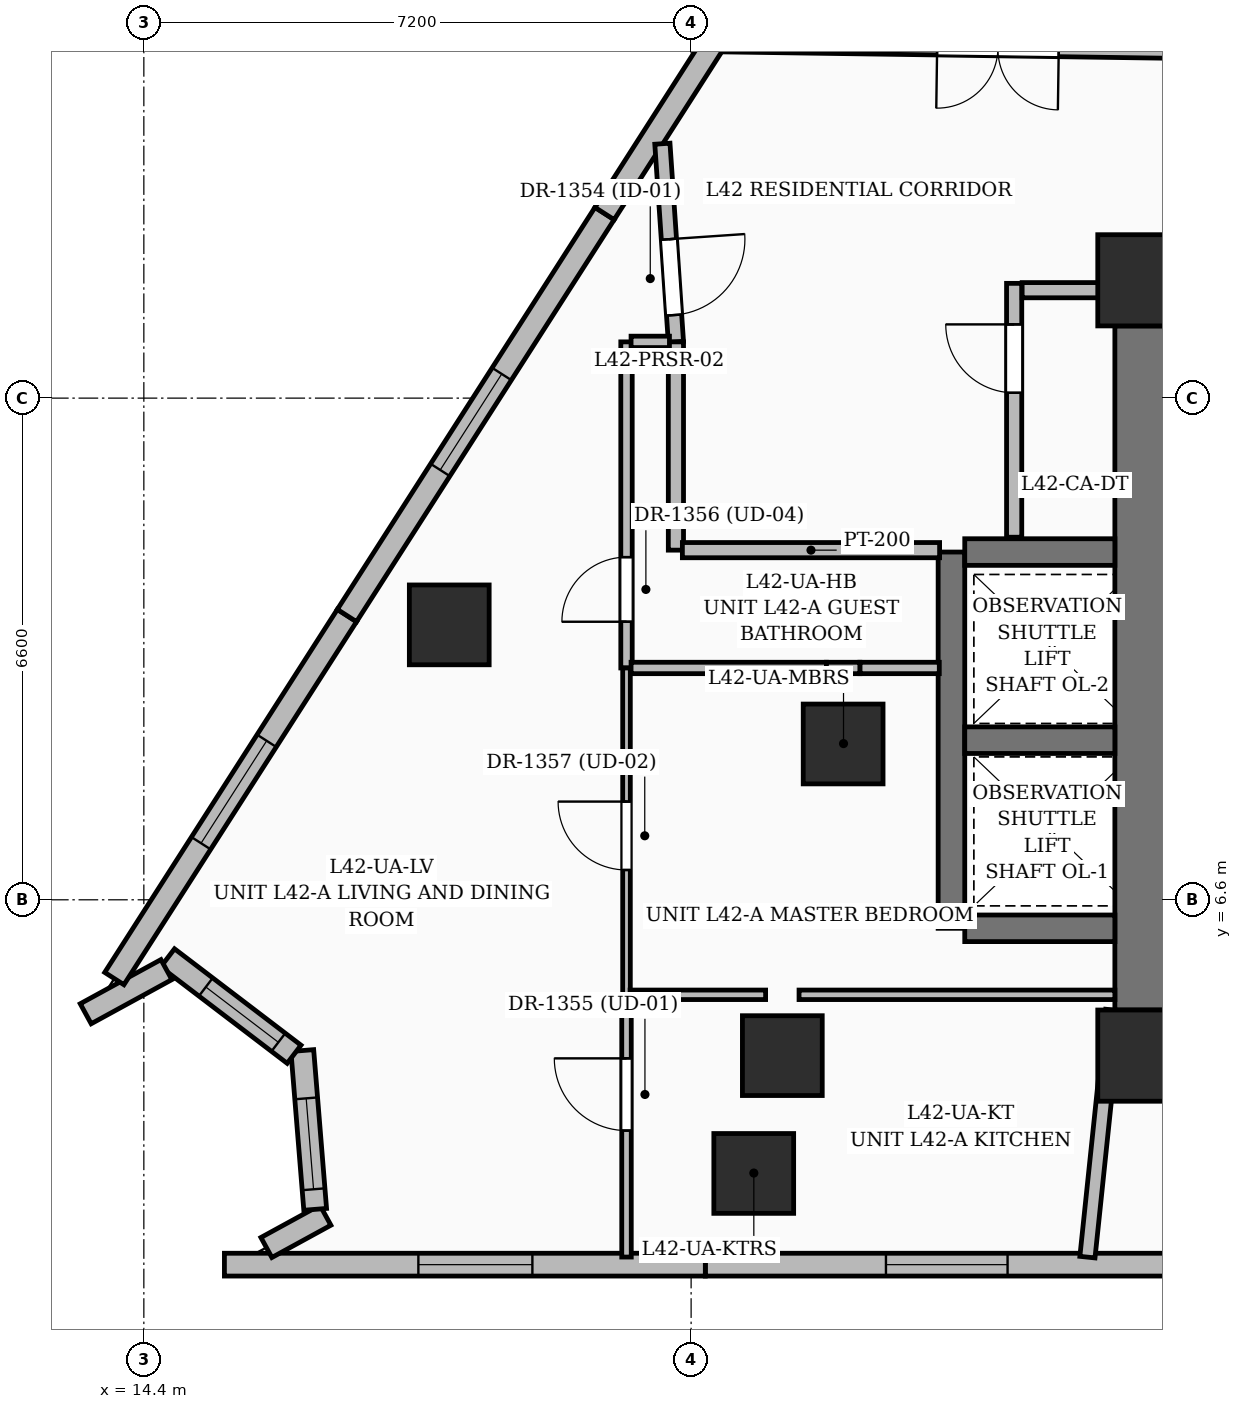
"""IFC4 building model, lengths in metres.
Left out: names, types, materials, properties, quantities, classifications, styles, units other than length and angle.
Written with IfcOpenShell. Run it as: python <this file> out.ifc"""

import sys

from ifc_helpers import new_model, si_unit, direction, frame, frame_2d, origin, origin_2d, place, context, subcontext, project, spatial, rectangle, extrude, element, fill, save


model = new_model("IFC4")
c1 = context("Model", 3, precision=1e-05, world=origin(), true_north=direction((0.0, 1.0)))
c2 = subcontext(c1, "Body", "Model", "MODEL_VIEW")
j1 = project(units=[si_unit("LENGTHUNIT", "METRE"), si_unit("PLANEANGLEUNIT", "RADIAN")], contexts=[c1])
p1 = place(None, origin())
s1 = spatial("IfcSite", under=j1, at=p1, CompositionType="ELEMENT")
p2 = place(p1, origin())
s2 = spatial("IfcBuilding", under=s1, at=p2, CompositionType="ELEMENT")
p3 = place(p2, frame((0.0, 0.0, 164.4)))
s3 = spatial("IfcBuildingStorey", under=s2, at=p3, CompositionType="ELEMENT", Elevation=164.4)
for number, where, z_axis, x_axis in (
    (1, (27.55, 4.55, 0.0), (0.0, 0.0, 1.0), (1.0, 0.0, 0.0)),
    (2, (27.55, 14.75, 0.0), (0.0, 0.0, 1.0), (1.0, 0.0, 0.0)),
):
    element("IfcColumn", number, at=place(p3, frame(where, z_axis=z_axis, x_axis=x_axis)), inside=s3, PredefinedType="COLUMN", context=c2, shape_type="SweptSolid", body=[
        extrude(rectangle(XDim=1.2, YDim=1.2, at=origin_2d()), origin(), (0.0, 0.0, 1.0), 3.6),
    ])
for number, where, z_axis, x_axis in (
    (3, (22.8, 4.55, 0.0), (0.0, 0.0, 1.0), (1.0, 0.0, 0.0)),
    (4, (23.6, 8.65, 0.0), (0.0, 0.0, 1.0), (1.0, 0.0, 0.0)),
):
    element("IfcColumn", number, at=place(p3, frame(where, z_axis=z_axis, x_axis=x_axis)), inside=s3, PredefinedType="COLUMN", context=c2, shape_type="SweptSolid", body=[
        extrude(rectangle(XDim=1.05, YDim=1.05, at=origin_2d()), origin(), (0.0, 0.0, 1.0), 3.6),
    ])
p4 = place(p3, frame((27.55, 5.15, 0.0), z_axis=(0.0, 0.0, 1.0), x_axis=(0.0, 1.0, 0.0)))
e5 = element("IfcWall", 5, at=p4, inside=s3, PredefinedType="SHEAR", context=c2, shape_type="SweptSolid", body=[
    extrude(rectangle(XDim=9.0, YDim=0.75, at=frame_2d((4.5, 0.0))), origin(), (0.0, 0.0, 1.0), 3.6),
])
p5 = place(p3, frame((25.025, 6.225, 0.0), z_axis=(0.0, 0.0, 1.0), x_axis=(0.0, 1.0, 0.0)))
e6 = element("IfcWall", 6, at=p5, inside=s3, PredefinedType="SOLIDWALL", context=c2, shape_type="SweptSolid", body=[
    extrude(rectangle(XDim=4.95, YDim=0.35, at=frame_2d((2.475, 0.0))), origin(), (0.0, 0.0, 1.0), 3.6),
])
for number, where, z_axis, x_axis in (
    (7, (25.2, 6.225, 0.0), (0.0, 0.0, 1.0), (1.0, 0.0, 0.0)),
    (8, (25.2, 8.7, 0.0), (0.0, 0.0, 1.0), (1.0, 0.0, 0.0)),
    (9, (25.2, 11.175, 0.0), (0.0, 0.0, 1.0), (1.0, 0.0, 0.0)),
):
    element("IfcWall", number, at=place(p3, frame(where, z_axis=z_axis, x_axis=x_axis)), inside=s3, PredefinedType="SOLIDWALL", context=c2, shape_type="SweptSolid", body=[
        extrude(rectangle(XDim=1.975, YDim=0.35, at=frame_2d((0.988, 0.0))), origin(), (0.0, 0.0, 1.0), 3.6),
    ])
for number, where, z_axis, x_axis in (
    (10, (22.424, 3.0, 0.0), (0.0, 0.0, 1.0), (1.0, 0.0, 0.0)),
    (11, (18.418, 10.217, 0.0), (0.0, 0.0, 1.0), (1.0, 0.0, 0.0)),
):
    element("IfcColumn", number, at=place(p3, frame(where, z_axis=z_axis, x_axis=x_axis)), inside=s3, PredefinedType="COLUMN", context=c2, shape_type="SweptSolid", body=[
        extrude(rectangle(XDim=1.05, YDim=1.05, at=origin_2d()), origin(), (0.0, 0.0, 1.0), 3.6),
    ])
p6 = place(p3, frame((28.113, 1.8, 0.0), z_axis=(0.0, 0.0, 1.0), x_axis=(-1.0, 0.0, 0.0)))
e12 = element("IfcWall", 12, at=p6, inside=s3, PredefinedType="SOLIDWALL", context=c2, shape_type="SweptSolid", body=[
    extrude(rectangle(XDim=6.327, YDim=0.3, at=frame_2d((3.163, 0.0))), origin(), (0.0, 0.0, 1.0), 3.35),
])
p7 = place(p6, frame((2.35, 0.0, 0.55)))
e13 = element("IfcOpeningElement", 13, at=p7, cuts=e12, PredefinedType="OPENING", context=c2, shape_type="SweptSolid", body=[
    extrude(rectangle(XDim=1.6, YDim=2.2, at=frame_2d((0.8, 1.1))), frame((0.0, 0.16, 0.0), z_axis=(0.0, -1.0, 0.0), x_axis=(1.0, 0.0, 0.0)), (0.0, 0.0, 1.0), 0.32),
])
p8 = place(p3, frame((21.787, 1.8, 0.0), z_axis=(0.0, 0.0, 1.0), x_axis=(-1.0, 0.0, 0.0)))
e14 = element("IfcWall", 14, at=p8, inside=s3, PredefinedType="SOLIDWALL", context=c2, shape_type="SweptSolid", body=[
    extrude(rectangle(XDim=6.327, YDim=0.3, at=frame_2d((3.163, 0.0))), origin(), (0.0, 0.0, 1.0), 3.35),
])
p9 = place(p8, frame((2.275, 0.0, 0.6)))
e15 = element("IfcOpeningElement", 15, at=p9, cuts=e14, PredefinedType="OPENING", context=c2, shape_type="SweptSolid", body=[
    extrude(rectangle(XDim=1.5, YDim=2.1, at=frame_2d((0.75, 1.05))), frame((0.0, 0.16, 0.0), z_axis=(0.0, -1.0, 0.0), x_axis=(1.0, 0.0, 0.0)), (0.0, 0.0, 1.0), 0.32),
])
p10 = place(p3, frame((16.012, 2.025, 0.0), z_axis=(0.0, 0.0, 1.0), x_axis=(0.877262241919, 0.480011415389, 0.0)))
e16 = element("IfcWall", 16, at=p10, inside=s3, PredefinedType="SOLIDWALL", context=c2, shape_type="SweptSolid", body=[
    extrude(rectangle(XDim=0.885, YDim=0.3, at=frame_2d((0.442, 0.0))), origin(), (0.0, 0.0, 1.0), 3.35),
])
p11 = place(p3, frame((16.654, 2.528, 0.0), z_axis=(0.0, 0.0, 1.0), x_axis=(-0.080962879454, 0.996717117416, 0.0)))
e17 = element("IfcWall", 17, at=p11, inside=s3, PredefinedType="SOLIDWALL", context=c2, shape_type="SweptSolid", body=[
    extrude(rectangle(XDim=2.096, YDim=0.3, at=frame_2d((1.048, 0.0))), origin(), (0.0, 0.0, 1.0), 3.35),
])
p12 = place(p11, frame((0.265, 0.0, 0.8)))
e18 = element("IfcOpeningElement", 18, at=p12, cuts=e17, PredefinedType="OPENING", context=c2, shape_type="SweptSolid", body=[
    extrude(rectangle(XDim=1.2, YDim=1.8, at=frame_2d((0.6, 0.9))), frame((0.0, 0.16, 0.0), z_axis=(0.0, -1.0, 0.0), x_axis=(1.0, 0.0, 0.0)), (0.0, 0.0, 1.0), 0.32),
])
p13 = place(p3, frame((16.377, 4.568, 0.0), z_axis=(0.0, 0.0, 1.0), x_axis=(-0.795383499791, 0.606106499107, 0.0)))
e19 = element("IfcWall", 19, at=p13, inside=s3, PredefinedType="SOLIDWALL", context=c2, shape_type="SweptSolid", body=[
    extrude(rectangle(XDim=2.092, YDim=0.3, at=frame_2d((1.046, 0.0))), origin(), (0.0, 0.0, 1.0), 3.35),
])
p14 = place(p13, frame((0.26, 0.0, 0.8)))
e20 = element("IfcOpeningElement", 20, at=p14, cuts=e19, PredefinedType="OPENING", context=c2, shape_type="SweptSolid", body=[
    extrude(rectangle(XDim=1.2, YDim=1.8, at=frame_2d((0.6, 0.9))), frame((0.0, 0.16, 0.0), z_axis=(0.0, -1.0, 0.0), x_axis=(1.0, 0.0, 0.0)), (0.0, 0.0, 1.0), 0.32),
])
p15 = place(p3, frame((14.697, 5.681, 0.0), z_axis=(0.0, 0.0, 1.0), x_axis=(-0.877355211776, -0.47984146587, 0.0)))
e21 = element("IfcWall", 21, at=p15, inside=s3, PredefinedType="SOLIDWALL", context=c2, shape_type="SweptSolid", body=[
    extrude(rectangle(XDim=1.21, YDim=0.3, at=frame_2d((0.605, 0.0))), origin(), (0.0, 0.0, 1.0), 3.35),
])
p16 = place(p3, frame((14.012, 5.564, 0.0), z_axis=(0.0, 0.0, 1.0), x_axis=(0.539510437932, 0.841978911471, 0.0)))
e22 = element("IfcWall", 22, at=p16, inside=s3, PredefinedType="SOLIDWALL", context=c2, shape_type="SweptSolid", body=[
    extrude(rectangle(XDim=5.672, YDim=0.3, at=frame_2d((2.836, 0.0))), origin(), (0.0, 0.0, 1.0), 3.35),
])
p17 = place(p16, frame((2.115, 0.0, 0.55)))
e23 = element("IfcOpeningElement", 23, at=p17, cuts=e22, PredefinedType="OPENING", context=c2, shape_type="SweptSolid", body=[
    extrude(rectangle(XDim=1.6, YDim=2.2, at=frame_2d((0.8, 1.1))), frame((0.0, 0.16, 0.0), z_axis=(0.0, -1.0, 0.0), x_axis=(1.0, 0.0, 0.0)), (0.0, 0.0, 1.0), 0.32),
])
p18 = place(p3, frame((17.072, 10.339, 0.0), z_axis=(0.0, 0.0, 1.0), x_axis=(0.539533329528, 0.841964242904, 0.0)))
e24 = element("IfcWall", 24, at=p18, inside=s3, PredefinedType="SOLIDWALL", context=c2, shape_type="SweptSolid", body=[
    extrude(rectangle(XDim=6.282, YDim=0.3, at=frame_2d((3.141, 0.0))), origin(), (0.0, 0.0, 1.0), 3.35),
])
p19 = place(p18, frame((2.275, 0.0, 0.6)))
e25 = element("IfcOpeningElement", 25, at=p19, cuts=e24, PredefinedType="OPENING", context=c2, shape_type="SweptSolid", body=[
    extrude(rectangle(XDim=1.5, YDim=2.1, at=frame_2d((0.75, 1.05))), frame((0.0, 0.16, 0.0), z_axis=(0.0, -1.0, 0.0), x_axis=(1.0, 0.0, 0.0)), (0.0, 0.0, 1.0), 0.32),
])
p20 = place(p3, frame((20.461, 15.629, 0.0), z_axis=(0.0, 0.0, 1.0), x_axis=(0.539533786056, 0.841963950359, 0.0)))
e26 = element("IfcWall", 26, at=p20, inside=s3, PredefinedType="SOLIDWALL", context=c2, shape_type="SweptSolid", body=[
    extrude(rectangle(XDim=6.002, YDim=0.3, at=frame_2d((3.001, 0.0))), origin(), (0.0, 0.0, 1.0), 3.35),
])
p21 = place(p20, frame((3.8, 0.0, 0.8)))
e27 = element("IfcOpeningElement", 27, at=p21, cuts=e26, PredefinedType="OPENING", context=c2, shape_type="SweptSolid", body=[
    extrude(rectangle(XDim=1.2, YDim=1.8, at=frame_2d((0.6, 0.9))), frame((0.0, 0.16, 0.0), z_axis=(0.0, -1.0, 0.0), x_axis=(1.0, 0.0, 0.0)), (0.0, 0.0, 1.0), 0.32),
])
p22 = place(p3, frame((25.85, 11.37, 0.0), z_axis=(0.0, 0.0, 1.0), x_axis=(0.0, 1.0, 0.0)))
e28 = element("IfcWall", 28, at=p22, inside=s3, PredefinedType="PARTITIONING", context=c2, shape_type="SweptSolid", body=[
    extrude(rectangle(XDim=3.34, YDim=0.2, at=frame_2d((1.67, 0.0))), origin(), (0.0, 0.0, 1.0), 3.35),
])
p23 = place(p22, frame((1.9, 0.0, 0.0)))
e29 = element("IfcOpeningElement", 29, at=p23, cuts=e28, PredefinedType="OPENING", context=c2, shape_type="SweptSolid", body=[
    extrude(rectangle(XDim=0.9, YDim=2.1, at=frame_2d((0.45, 1.05))), frame((0.0, 0.11, 0.0), z_axis=(0.0, -1.0, 0.0), x_axis=(1.0, 0.0, 0.0)), (0.0, 0.0, 1.0), 0.22),
])
p24 = place(p3, frame((25.955, 14.62, 0.0), z_axis=(0.0, 0.0, 1.0), x_axis=(1.0, 0.0, 0.0)))
e30 = element("IfcWall", 30, at=p24, inside=s3, PredefinedType="PARTITIONING", context=c2, shape_type="SweptSolid", body=[
    extrude(rectangle(XDim=1.205, YDim=0.2, at=frame_2d((0.603, 0.0))), origin(), (0.0, 0.0, 1.0), 3.35),
])
p25 = place(p3, frame((21.222, 16.547, 0.0), z_axis=(0.0, 0.0, 1.0), x_axis=(0.068106312632, -0.997678069409, 0.0)))
e31 = element("IfcWall", 31, at=p25, inside=s3, PredefinedType="PARTITIONING", context=c2, shape_type="SweptSolid", body=[
    extrude(rectangle(XDim=2.613, YDim=0.2, at=frame_2d((1.307, 0.0))), origin(), (0.0, 0.0, 1.0), 2.57),
])
p26 = place(p25, frame((1.26, 0.0, 0.0)))
e32 = element("IfcOpeningElement", 32, at=p26, cuts=e31, PredefinedType="OPENING", context=c2, shape_type="SweptSolid", body=[
    extrude(rectangle(XDim=1.0, YDim=2.2, at=frame_2d((0.5, 1.1))), frame((0.0, 0.11, 0.0), z_axis=(0.0, -1.0, 0.0), x_axis=(1.0, 0.0, 0.0)), (0.0, 0.0, 1.0), 0.22),
])
p27 = place(p3, frame((21.4, 13.94, 0.0), z_axis=(0.0, 0.0, 1.0), x_axis=(0.0, -1.0, 0.0)))
e33 = element("IfcWall", 33, at=p27, inside=s3, PredefinedType="PARTITIONING", context=c2, shape_type="SweptSolid", body=[
    extrude(rectangle(XDim=2.74, YDim=0.2, at=frame_2d((1.37, 0.0))), origin(), (0.0, 0.0, 1.0), 3.35),
])
p28 = place(p3, frame((21.485, 11.2, 0.0), z_axis=(0.0, 0.0, 1.0), x_axis=(1.0, 0.0, 0.0)))
e34 = element("IfcWall", 34, at=p28, inside=s3, PredefinedType="PARTITIONING", context=c2, shape_type="SweptSolid", body=[
    extrude(rectangle(XDim=3.384, YDim=0.2, at=frame_2d((1.692, 0.0))), origin(), (0.0, 0.0, 1.0), 3.35),
])
p29 = place(p3, frame((29.315, 17.751, 0.0), z_axis=(0.0, 0.0, 1.0), x_axis=(-0.999898159275, 0.014271337684, 0.0)))
e35 = element("IfcWall", 35, at=p29, inside=s3, PredefinedType="PARTITIONING", context=c2, shape_type="SweptSolid", body=[
    extrude(rectangle(XDim=7.288, YDim=0.2, at=frame_2d((3.644, 0.0))), origin(), (0.0, 0.0, 1.0), 2.393),
])
p30 = place(p29, frame((2.879, 0.0, 0.0)))
e36 = element("IfcOpeningElement", 36, at=p30, cuts=e35, PredefinedType="OPENING", context=c2, shape_type="SweptSolid", body=[
    extrude(rectangle(XDim=1.6, YDim=2.3, at=frame_2d((0.8, 1.15))), frame((0.0, 0.11, 0.0), z_axis=(0.0, -1.0, 0.0), x_axis=(1.0, 0.0, 0.0)), (0.0, 0.0, 1.0), 0.22),
])
p31 = place(p3, frame((20.75, 9.65, 0.0), z_axis=(0.0, 0.0, 1.0), x_axis=(0.0, 1.0, 0.0)))
e37 = element("IfcWall", 37, at=p31, inside=s3, PredefinedType="PARTITIONING", context=c2, shape_type="SweptSolid", body=[
    extrude(rectangle(XDim=4.29, YDim=0.15, at=frame_2d((2.145, 0.0))), origin(), (0.0, 0.0, 1.0), 2.393),
])
p32 = place(p31, frame((0.608, 0.0, 0.0)))
e38 = element("IfcOpeningElement", 38, at=p32, cuts=e37, PredefinedType="OPENING", context=c2, shape_type="SweptSolid", body=[
    extrude(rectangle(XDim=0.85, YDim=2.1, at=frame_2d((0.425, 1.05))), frame((0.0, 0.085, 0.0), z_axis=(0.0, -1.0, 0.0), x_axis=(1.0, 0.0, 0.0)), (0.0, 0.0, 1.0), 0.17),
])
p33 = place(p3, frame((20.81, 13.94, 0.0), z_axis=(0.0, 0.0, 1.0), x_axis=(1.0, 0.0, 0.0)))
e39 = element("IfcWall", 39, at=p33, inside=s3, PredefinedType="PARTITIONING", context=c2, shape_type="SweptSolid", body=[
    extrude(rectangle(XDim=0.505, YDim=0.15, at=frame_2d((0.252, 0.0))), origin(), (0.0, 0.0, 1.0), 2.57),
])
p34 = place(p3, frame((20.75, 1.9, 0.0), z_axis=(0.0, 0.0, 1.0), x_axis=(0.0, 1.0, 0.0)))
e40 = element("IfcWall", 40, at=p34, inside=s3, PredefinedType="PARTITIONING", context=c2, shape_type="SweptSolid", body=[
    extrude(rectangle(XDim=3.45, YDim=0.125, at=frame_2d((1.725, 0.0))), origin(), (0.0, 0.0, 1.0), 3.35),
])
p35 = place(p34, frame((1.664, 0.0, 0.0)))
e41 = element("IfcOpeningElement", 41, at=p35, cuts=e40, PredefinedType="OPENING", context=c2, shape_type="SweptSolid", body=[
    extrude(rectangle(XDim=0.95, YDim=2.2, at=frame_2d((0.475, 1.1))), frame((0.0, 0.072, 0.0), z_axis=(0.0, -1.0, 0.0), x_axis=(1.0, 0.0, 0.0)), (0.0, 0.0, 1.0), 0.145),
])
p36 = place(p3, frame((20.75, 5.35, 0.0), z_axis=(0.0, 0.0, 1.0), x_axis=(0.0, 1.0, 0.0)))
e42 = element("IfcWall", 42, at=p36, inside=s3, PredefinedType="PARTITIONING", context=c2, shape_type="SweptSolid", body=[
    extrude(rectangle(XDim=4.3, YDim=0.1, at=frame_2d((2.15, 0.0))), origin(), (0.0, 0.0, 1.0), 2.393),
])
p37 = place(p36, frame((1.642, 0.0, 0.0)))
e43 = element("IfcOpeningElement", 43, at=p37, cuts=e42, PredefinedType="OPENING", context=c2, shape_type="SweptSolid", body=[
    extrude(rectangle(XDim=0.9, YDim=2.15, at=frame_2d((0.45, 1.075))), frame((0.0, 0.06, 0.0), z_axis=(0.0, -1.0, 0.0), x_axis=(1.0, 0.0, 0.0)), (0.0, 0.0, 1.0), 0.12),
])
p38 = place(p3, frame((20.81, 9.65, 0.0), z_axis=(0.0, 0.0, 1.0), x_axis=(1.0, 0.0, 0.0)))
e44 = element("IfcWall", 44, at=p38, inside=s3, PredefinedType="PARTITIONING", context=c2, shape_type="SweptSolid", body=[
    extrude(rectangle(XDim=2.57, YDim=0.15, at=frame_2d((1.285, 0.0))), origin(), (0.0, 0.0, 1.0), 2.393),
])
p39 = place(p3, frame((23.82, 9.65, 0.0), z_axis=(0.0, 0.0, 1.0), x_axis=(1.0, 0.0, 0.0)))
e45 = element("IfcWall", 45, at=p39, inside=s3, PredefinedType="PARTITIONING", context=c2, shape_type="SweptSolid", body=[
    extrude(rectangle(XDim=1.045, YDim=0.15, at=frame_2d((0.522, 0.0))), origin(), (0.0, 0.0, 1.0), 3.35),
])
p40 = place(p3, frame((22.58, 5.35, 0.0), z_axis=(0.0, 0.0, 1.0), x_axis=(-1.0, 0.0, 0.0)))
e46 = element("IfcWall", 46, at=p40, inside=s3, PredefinedType="PARTITIONING", context=c2, shape_type="SweptSolid", body=[
    extrude(rectangle(XDim=1.782, YDim=0.125, at=frame_2d((0.891, 0.0))), origin(), (0.0, 0.0, 1.0), 2.57),
])
p41 = place(p3, frame((27.175, 5.35, 0.0), z_axis=(0.0, 0.0, 1.0), x_axis=(-1.0, 0.0, 0.0)))
e47 = element("IfcWall", 47, at=p41, inside=s3, PredefinedType="PARTITIONING", context=c2, shape_type="SweptSolid", body=[
    extrude(rectangle(XDim=4.155, YDim=0.125, at=frame_2d((2.078, 0.0))), origin(), (0.0, 0.0, 1.0), 3.35),
])
p42 = place(p3, frame((26.814, 1.899, 0.0), z_axis=(0.0, 0.0, 1.0), x_axis=(0.104043246785, 0.994572774008, 0.0)))
e48 = element("IfcWall", 48, at=p42, inside=s3, PredefinedType="PARTITIONING", context=c2, shape_type="SweptSolid", body=[
    extrude(rectangle(XDim=3.269, YDim=0.2, at=frame_2d((1.634, 0.0))), origin(), (0.0, 0.0, 1.0), 2.57),
])
p43 = place(p3, frame((23.38, 9.65, 0.0), z_axis=(0.0, 0.0, 1.0), x_axis=(1.0, 0.0, 0.0)))
e49 = element("IfcWall", 49, at=p43, inside=s3, PredefinedType="PARTITIONING", context=c2, shape_type="SweptSolid", body=[
    extrude(rectangle(XDim=0.44, YDim=0.15, at=frame_2d((0.22, 0.0))), origin(), (0.0, 0.0, 1.0), 3.35),
])
p44 = place(p7, origin())
e50 = element("IfcWindow", 50, at=p44, inside=s3, PartitioningType="SINGLE_PANEL", PredefinedType="WINDOW", context=c2, shape_type="SweptSolid", body=[
    extrude(rectangle(XDim=1.6, YDim=2.2, at=frame_2d((0.8, 1.1))), frame((0.0, 0.03, 0.0), z_axis=(0.0, -1.0, 0.0), x_axis=(1.0, 0.0, 0.0)), (0.0, 0.0, 1.0), 0.06),
])
fill(e13, e50)
p45 = place(p9, origin())
e51 = element("IfcWindow", 51, at=p45, inside=s3, PartitioningType="SINGLE_PANEL", PredefinedType="WINDOW", context=c2, shape_type="SweptSolid", body=[
    extrude(rectangle(XDim=1.5, YDim=2.1, at=frame_2d((0.75, 1.05))), frame((0.0, 0.03, 0.0), z_axis=(0.0, -1.0, 0.0), x_axis=(1.0, 0.0, 0.0)), (0.0, 0.0, 1.0), 0.06),
])
fill(e15, e51)
p46 = place(p12, origin())
e52 = element("IfcWindow", 52, at=p46, inside=s3, PartitioningType="SINGLE_PANEL", PredefinedType="WINDOW", context=c2, shape_type="SweptSolid", body=[
    extrude(rectangle(XDim=1.2, YDim=1.8, at=frame_2d((0.6, 0.9))), frame((0.0, 0.03, 0.0), z_axis=(0.0, -1.0, 0.0), x_axis=(1.0, 0.0, 0.0)), (0.0, 0.0, 1.0), 0.06),
])
fill(e18, e52)
p47 = place(p14, origin())
e53 = element("IfcWindow", 53, at=p47, inside=s3, PartitioningType="SINGLE_PANEL", PredefinedType="WINDOW", context=c2, shape_type="SweptSolid", body=[
    extrude(rectangle(XDim=1.2, YDim=1.8, at=frame_2d((0.6, 0.9))), frame((0.0, 0.03, 0.0), z_axis=(0.0, -1.0, 0.0), x_axis=(1.0, 0.0, 0.0)), (0.0, 0.0, 1.0), 0.06),
])
fill(e20, e53)
p48 = place(p17, origin())
e54 = element("IfcWindow", 54, at=p48, inside=s3, PartitioningType="SINGLE_PANEL", PredefinedType="WINDOW", context=c2, shape_type="SweptSolid", body=[
    extrude(rectangle(XDim=1.6, YDim=2.2, at=frame_2d((0.8, 1.1))), frame((0.0, 0.03, 0.0), z_axis=(0.0, -1.0, 0.0), x_axis=(1.0, 0.0, 0.0)), (0.0, 0.0, 1.0), 0.06),
])
fill(e23, e54)
p49 = place(p19, origin())
e55 = element("IfcWindow", 55, at=p49, inside=s3, PartitioningType="SINGLE_PANEL", PredefinedType="WINDOW", context=c2, shape_type="SweptSolid", body=[
    extrude(rectangle(XDim=1.5, YDim=2.1, at=frame_2d((0.75, 1.05))), frame((0.0, 0.03, 0.0), z_axis=(0.0, -1.0, 0.0), x_axis=(1.0, 0.0, 0.0)), (0.0, 0.0, 1.0), 0.06),
])
fill(e25, e55)
p50 = place(p23, origin())
e56 = element("IfcDoor", 56, at=p50, inside=s3, OperationType="SINGLE_SWING_RIGHT", PredefinedType="DOOR", context=c2, shape_type="SweptSolid", body=[
    extrude(rectangle(XDim=0.9, YDim=2.1, at=frame_2d((0.45, 1.05))), frame((0.0, 0.025, 0.0), z_axis=(0.0, -1.0, 0.0), x_axis=(1.0, 0.0, 0.0)), (0.0, 0.0, 1.0), 0.05),
])
fill(e29, e56)
p51 = place(p26, origin())
e57 = element("IfcDoor", 57, at=p51, inside=s3, OperationType="SINGLE_SWING_LEFT", PredefinedType="DOOR", context=c2, shape_type="SweptSolid", body=[
    extrude(rectangle(XDim=1.0, YDim=2.2, at=frame_2d((0.5, 1.1))), frame((0.0, 0.025, 0.0), z_axis=(0.0, -1.0, 0.0), x_axis=(1.0, 0.0, 0.0)), (0.0, 0.0, 1.0), 0.05),
])
fill(e32, e57)
p52 = place(p35, origin())
e58 = element("IfcDoor", 58, at=p52, inside=s3, OperationType="SINGLE_SWING_RIGHT", PredefinedType="DOOR", context=c2, shape_type="SweptSolid", body=[
    extrude(rectangle(XDim=0.95, YDim=2.2, at=frame_2d((0.475, 1.1))), frame((0.0, 0.025, 0.0), z_axis=(0.0, -1.0, 0.0), x_axis=(1.0, 0.0, 0.0)), (0.0, 0.0, 1.0), 0.05),
])
fill(e41, e58)
p53 = place(p32, origin())
e59 = element("IfcDoor", 59, at=p53, inside=s3, OperationType="SINGLE_SWING_LEFT", PredefinedType="DOOR", context=c2, shape_type="SweptSolid", body=[
    extrude(rectangle(XDim=0.85, YDim=2.1, at=frame_2d((0.425, 1.05))), frame((0.0, 0.025, 0.0), z_axis=(0.0, -1.0, 0.0), x_axis=(1.0, 0.0, 0.0)), (0.0, 0.0, 1.0), 0.05),
])
fill(e38, e59)
p54 = place(p37, origin())
e60 = element("IfcDoor", 60, at=p54, inside=s3, OperationType="SINGLE_SWING_RIGHT", PredefinedType="DOOR", context=c2, shape_type="SweptSolid", body=[
    extrude(rectangle(XDim=0.9, YDim=2.15, at=frame_2d((0.45, 1.075))), frame((0.0, 0.025, 0.0), z_axis=(0.0, -1.0, 0.0), x_axis=(1.0, 0.0, 0.0)), (0.0, 0.0, 1.0), 0.05),
])
fill(e43, e60)
save(model, sys.argv[1])
